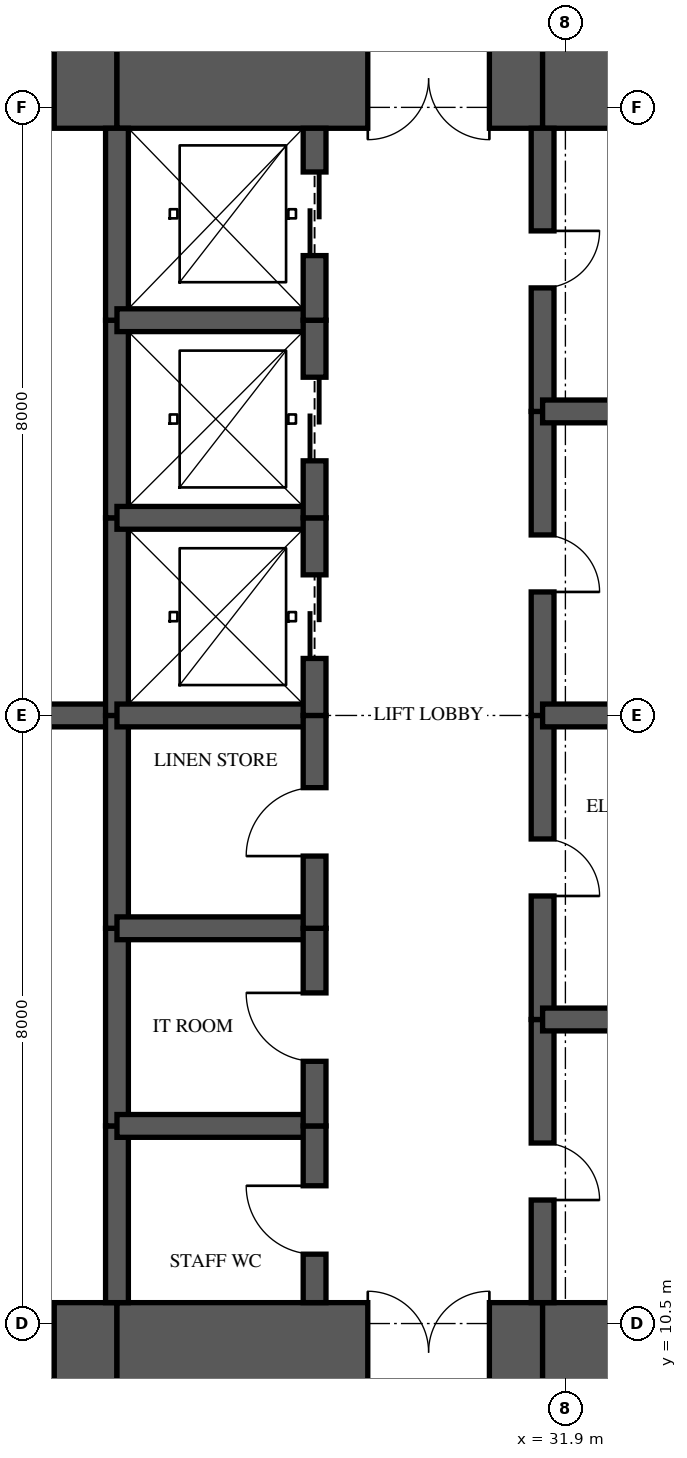
"""IFC4 building model, lengths in metres.
Left out: names, types, materials, properties, quantities, classifications, styles, units other than length and angle.
Written with IfcOpenShell. Run it as: python <this file> out.ifc"""

import sys

from ifc_helpers import new_model, si_unit, direction, frame, frame_2d, origin, place, context, subcontext, project, spatial, rectangle, extrude, element, fill, save


model = new_model("IFC4")
c1 = context("Model", 3, precision=1e-05, world=origin(), true_north=direction((0.0, 1.0)))
c2 = subcontext(c1, "Body", "Model", "MODEL_VIEW")
j1 = project(units=[si_unit("LENGTHUNIT", "METRE"), si_unit("PLANEANGLEUNIT", "RADIAN")], contexts=[c1])
p1 = place(None, origin())
s1 = spatial("IfcSite", under=j1, at=p1, CompositionType="ELEMENT")
p2 = place(p1, origin())
s2 = spatial("IfcBuilding", under=s1, at=p2, CompositionType="ELEMENT")
p3 = place(p2, frame((0.0, 0.0, 174.45)))
s3 = spatial("IfcBuildingStorey", under=s2, at=p3, CompositionType="ELEMENT", Elevation=174.45)
p4 = place(p3, frame((19.65, 10.125, 0.0), z_axis=(0.0, 0.0, 1.0), x_axis=(1.0, 0.0, 0.0)))
e1 = element("IfcWall", 1, at=p4, inside=s3, PredefinedType="SHEAR", context=c2, shape_type="SweptSolid", body=[
    extrude(rectangle(XDim=6.35, YDim=1.3, at=frame_2d((3.175, 0.0))), origin(), (0.0, 0.0, 1.0), 3.35),
])
p5 = place(p4, frame((4.775, 0.0, 0.0)))
e2 = element("IfcOpeningElement", 2, at=p5, cuts=e1, PredefinedType="OPENING", context=c2, shape_type="SweptSolid", body=[
    extrude(rectangle(XDim=0.75, YDim=2.1, at=frame_2d((0.375, 1.05))), frame((0.0, 0.66, 0.0), z_axis=(0.0, -1.0, 0.0), x_axis=(1.0, 0.0, 0.0)), (0.0, 0.0, 1.0), 1.32),
])
p6 = place(p3, frame((26.0, 10.125, 0.0), z_axis=(0.0, 0.0, 1.0), x_axis=(1.0, 0.0, 0.0)))
e3 = element("IfcWall", 3, at=p6, inside=s3, PredefinedType="SHEAR", context=c2, shape_type="SweptSolid", body=[
    extrude(rectangle(XDim=5.6, YDim=1.3, at=frame_2d((2.8, 0.0))), origin(), (0.0, 0.0, 1.0), 3.35),
])
p7 = place(p6, frame((3.3, 0.0, 0.0)))
e4 = element("IfcOpeningElement", 4, at=p7, cuts=e3, PredefinedType="OPENING", context=c2, shape_type="SweptSolid", body=[
    extrude(rectangle(XDim=1.6, YDim=2.1, at=frame_2d((0.8, 1.05))), frame((0.0, 0.66, 0.0), z_axis=(0.0, -1.0, 0.0), x_axis=(1.0, 0.0, 0.0)), (0.0, 0.0, 1.0), 1.32),
])
for number, where, z_axis, x_axis in (
    (5, (31.6, 10.125, 0.0), (0.0, 0.0, 1.0), (1.0, 0.0, 0.0)),
    (6, (35.9, 26.875, 0.0), (0.0, 0.0, 1.0), (-1.0, 0.0, 0.0)),
):
    element("IfcWall", number, at=place(p3, frame(where, z_axis=z_axis, x_axis=x_axis)), inside=s3, PredefinedType="SHEAR", context=c2, shape_type="SweptSolid", body=[
        extrude(rectangle(XDim=4.3, YDim=1.3, at=frame_2d((2.15, 0.0))), origin(), (0.0, 0.0, 1.0), 3.35),
    ])
p8 = place(p3, frame((31.6, 26.875, 0.0), z_axis=(0.0, 0.0, 1.0), x_axis=(-1.0, 0.0, 0.0)))
e7 = element("IfcWall", 7, at=p8, inside=s3, PredefinedType="SHEAR", context=c2, shape_type="SweptSolid", body=[
    extrude(rectangle(XDim=5.6, YDim=1.3, at=frame_2d((2.8, 0.0))), origin(), (0.0, 0.0, 1.0), 3.35),
])
p9 = place(p8, frame((0.7, 0.0, 0.0)))
e8 = element("IfcOpeningElement", 8, at=p9, cuts=e7, PredefinedType="OPENING", context=c2, shape_type="SweptSolid", body=[
    extrude(rectangle(XDim=1.6, YDim=2.1, at=frame_2d((0.8, 1.05))), frame((0.0, 0.66, 0.0), z_axis=(0.0, -1.0, 0.0), x_axis=(1.0, 0.0, 0.0)), (0.0, 0.0, 1.0), 1.32),
])
p10 = place(p3, frame((26.0, 26.875, 0.0), z_axis=(0.0, 0.0, 1.0), x_axis=(-1.0, 0.0, 0.0)))
e9 = element("IfcWall", 9, at=p10, inside=s3, PredefinedType="SHEAR", context=c2, shape_type="SweptSolid", body=[
    extrude(rectangle(XDim=6.35, YDim=1.3, at=frame_2d((3.175, 0.0))), origin(), (0.0, 0.0, 1.0), 3.35),
])
p11 = place(p10, frame((0.825, 0.0, 0.0)))
e10 = element("IfcOpeningElement", 10, at=p11, cuts=e9, PredefinedType="OPENING", context=c2, shape_type="SweptSolid", body=[
    extrude(rectangle(XDim=0.75, YDim=2.1, at=frame_2d((0.375, 1.05))), frame((0.0, 0.66, 0.0), z_axis=(0.0, -1.0, 0.0), x_axis=(1.0, 0.0, 0.0)), (0.0, 0.0, 1.0), 1.32),
])
p12 = place(p3, frame((26.0, 10.775, 0.0), z_axis=(0.0, 0.0, 1.0), x_axis=(0.0, 1.0, 0.0)))
e11 = element("IfcWall", 11, at=p12, inside=s3, PredefinedType="SHEAR", context=c2, shape_type="SweptSolid", body=[
    extrude(rectangle(XDim=2.325, YDim=0.3, at=frame_2d((1.163, 0.0))), origin(), (0.0, 0.0, 1.0), 3.35),
])
p13 = place(p3, frame((26.0, 13.1, 0.0), z_axis=(0.0, 0.0, 1.0), x_axis=(0.0, 1.0, 0.0)))
e12 = element("IfcWall", 12, at=p13, inside=s3, PredefinedType="SHEAR", context=c2, shape_type="SweptSolid", body=[
    extrude(rectangle(XDim=2.6, YDim=0.3, at=frame_2d((1.3, 0.0))), origin(), (0.0, 0.0, 1.0), 3.35),
])
p14 = place(p3, frame((26.0, 15.7, 0.0), z_axis=(0.0, 0.0, 1.0), x_axis=(0.0, 1.0, 0.0)))
e13 = element("IfcWall", 13, at=p14, inside=s3, PredefinedType="SHEAR", context=c2, shape_type="SweptSolid", body=[
    extrude(rectangle(XDim=2.8, YDim=0.3, at=frame_2d((1.4, 0.0))), origin(), (0.0, 0.0, 1.0), 3.35),
])
p15 = place(p3, frame((26.0, 18.5, 0.0), z_axis=(0.0, 0.0, 1.0), x_axis=(0.0, 1.0, 0.0)))
e14 = element("IfcWall", 14, at=p15, inside=s3, PredefinedType="SHEAR", context=c2, shape_type="SweptSolid", body=[
    extrude(rectangle(XDim=2.6, YDim=0.3, at=frame_2d((1.3, 0.0))), origin(), (0.0, 0.0, 1.0), 3.35),
])
p16 = place(p3, frame((26.0, 21.1, 0.0), z_axis=(0.0, 0.0, 1.0), x_axis=(0.0, 1.0, 0.0)))
e15 = element("IfcWall", 15, at=p16, inside=s3, PredefinedType="SHEAR", context=c2, shape_type="SweptSolid", body=[
    extrude(rectangle(XDim=2.6, YDim=0.3, at=frame_2d((1.3, 0.0))), origin(), (0.0, 0.0, 1.0), 3.35),
])
p17 = place(p3, frame((26.0, 23.7, 0.0), z_axis=(0.0, 0.0, 1.0), x_axis=(0.0, 1.0, 0.0)))
e16 = element("IfcWall", 16, at=p17, inside=s3, PredefinedType="SHEAR", context=c2, shape_type="SweptSolid", body=[
    extrude(rectangle(XDim=2.525, YDim=0.3, at=frame_2d((1.263, 0.0))), origin(), (0.0, 0.0, 1.0), 3.35),
])
p18 = place(p3, frame((28.6, 10.775, 0.0), z_axis=(0.0, 0.0, 1.0), x_axis=(0.0, 1.0, 0.0)))
e17 = element("IfcWall", 17, at=p18, inside=s3, PredefinedType="SHEAR", context=c2, shape_type="SweptSolid", body=[
    extrude(rectangle(XDim=2.325, YDim=0.3, at=frame_2d((1.163, 0.0))), origin(), (0.0, 0.0, 1.0), 3.35),
])
p19 = place(p18, frame((0.637, 0.0, 0.0)))
e18 = element("IfcOpeningElement", 18, at=p19, cuts=e17, PredefinedType="OPENING", context=c2, shape_type="SweptSolid", body=[
    extrude(rectangle(XDim=0.9, YDim=2.1, at=frame_2d((0.45, 1.05))), frame((0.0, 0.16, 0.0), z_axis=(0.0, -1.0, 0.0), x_axis=(1.0, 0.0, 0.0)), (0.0, 0.0, 1.0), 0.32),
])
p20 = place(p3, frame((28.6, 13.1, 0.0), z_axis=(0.0, 0.0, 1.0), x_axis=(0.0, 1.0, 0.0)))
e19 = element("IfcWall", 19, at=p20, inside=s3, PredefinedType="SHEAR", context=c2, shape_type="SweptSolid", body=[
    extrude(rectangle(XDim=2.6, YDim=0.3, at=frame_2d((1.3, 0.0))), origin(), (0.0, 0.0, 1.0), 3.35),
])
p21 = place(p20, frame((0.85, 0.0, 0.0)))
e20 = element("IfcOpeningElement", 20, at=p21, cuts=e19, PredefinedType="OPENING", context=c2, shape_type="SweptSolid", body=[
    extrude(rectangle(XDim=0.9, YDim=2.1, at=frame_2d((0.45, 1.05))), frame((0.0, 0.16, 0.0), z_axis=(0.0, -1.0, 0.0), x_axis=(1.0, 0.0, 0.0)), (0.0, 0.0, 1.0), 0.32),
])
p22 = place(p3, frame((28.6, 15.7, 0.0), z_axis=(0.0, 0.0, 1.0), x_axis=(0.0, 1.0, 0.0)))
e21 = element("IfcWall", 21, at=p22, inside=s3, PredefinedType="SHEAR", context=c2, shape_type="SweptSolid", body=[
    extrude(rectangle(XDim=2.8, YDim=0.3, at=frame_2d((1.4, 0.0))), origin(), (0.0, 0.0, 1.0), 3.35),
])
p23 = place(p22, frame((0.95, 0.0, 0.0)))
e22 = element("IfcOpeningElement", 22, at=p23, cuts=e21, PredefinedType="OPENING", context=c2, shape_type="SweptSolid", body=[
    extrude(rectangle(XDim=0.9, YDim=2.1, at=frame_2d((0.45, 1.05))), frame((0.0, 0.16, 0.0), z_axis=(0.0, -1.0, 0.0), x_axis=(1.0, 0.0, 0.0)), (0.0, 0.0, 1.0), 0.32),
])
p24 = place(p3, frame((28.6, 18.5, 0.0), z_axis=(0.0, 0.0, 1.0), x_axis=(0.0, 1.0, 0.0)))
e23 = element("IfcWall", 23, at=p24, inside=s3, PredefinedType="SHEAR", context=c2, shape_type="SweptSolid", body=[
    extrude(rectangle(XDim=2.6, YDim=0.3, at=frame_2d((1.3, 0.0))), origin(), (0.0, 0.0, 1.0), 3.35),
])
p25 = place(p24, frame((0.75, 0.0, 0.0)))
e24 = element("IfcOpeningElement", 24, at=p25, cuts=e23, PredefinedType="OPENING", context=c2, shape_type="SweptSolid", body=[
    extrude(rectangle(XDim=1.1, YDim=2.1, at=frame_2d((0.55, 1.05))), frame((0.0, 0.16, 0.0), z_axis=(0.0, -1.0, 0.0), x_axis=(1.0, 0.0, 0.0)), (0.0, 0.0, 1.0), 0.32),
])
p26 = place(p3, frame((28.6, 21.1, 0.0), z_axis=(0.0, 0.0, 1.0), x_axis=(0.0, 1.0, 0.0)))
e25 = element("IfcWall", 25, at=p26, inside=s3, PredefinedType="SHEAR", context=c2, shape_type="SweptSolid", body=[
    extrude(rectangle(XDim=2.6, YDim=0.3, at=frame_2d((1.3, 0.0))), origin(), (0.0, 0.0, 1.0), 3.35),
])
p27 = place(p26, frame((0.75, 0.0, 0.0)))
e26 = element("IfcOpeningElement", 26, at=p27, cuts=e25, PredefinedType="OPENING", context=c2, shape_type="SweptSolid", body=[
    extrude(rectangle(XDim=1.1, YDim=2.1, at=frame_2d((0.55, 1.05))), frame((0.0, 0.16, 0.0), z_axis=(0.0, -1.0, 0.0), x_axis=(1.0, 0.0, 0.0)), (0.0, 0.0, 1.0), 0.32),
])
p28 = place(p3, frame((28.6, 23.7, 0.0), z_axis=(0.0, 0.0, 1.0), x_axis=(0.0, 1.0, 0.0)))
e27 = element("IfcWall", 27, at=p28, inside=s3, PredefinedType="SHEAR", context=c2, shape_type="SweptSolid", body=[
    extrude(rectangle(XDim=2.525, YDim=0.3, at=frame_2d((1.263, 0.0))), origin(), (0.0, 0.0, 1.0), 3.35),
])
p29 = place(p28, frame((0.85, 0.0, 0.0)))
e28 = element("IfcOpeningElement", 28, at=p29, cuts=e27, PredefinedType="OPENING", context=c2, shape_type="SweptSolid", body=[
    extrude(rectangle(XDim=1.1, YDim=2.1, at=frame_2d((0.55, 1.05))), frame((0.0, 0.16, 0.0), z_axis=(0.0, -1.0, 0.0), x_axis=(1.0, 0.0, 0.0)), (0.0, 0.0, 1.0), 0.32),
])
p30 = place(p3, frame((31.6, 10.775, 0.0), z_axis=(0.0, 0.0, 1.0), x_axis=(0.0, 1.0, 0.0)))
e29 = element("IfcWall", 29, at=p30, inside=s3, PredefinedType="SHEAR", context=c2, shape_type="SweptSolid", body=[
    extrude(rectangle(XDim=3.725, YDim=0.3, at=frame_2d((1.863, 0.0))), origin(), (0.0, 0.0, 1.0), 3.35),
])
p31 = place(p30, frame((1.35, 0.0, 0.0)))
e30 = element("IfcOpeningElement", 30, at=p31, cuts=e29, PredefinedType="OPENING", context=c2, shape_type="SweptSolid", body=[
    extrude(rectangle(XDim=0.75, YDim=2.1, at=frame_2d((0.375, 1.05))), frame((0.0, 0.16, 0.0), z_axis=(0.0, -1.0, 0.0), x_axis=(1.0, 0.0, 0.0)), (0.0, 0.0, 1.0), 0.32),
])
p32 = place(p3, frame((31.6, 14.5, 0.0), z_axis=(0.0, 0.0, 1.0), x_axis=(0.0, 1.0, 0.0)))
e31 = element("IfcWall", 31, at=p32, inside=s3, PredefinedType="SHEAR", context=c2, shape_type="SweptSolid", body=[
    extrude(rectangle(XDim=4.0, YDim=0.3, at=frame_2d((2.0, 0.0))), origin(), (0.0, 0.0, 1.0), 3.35),
])
p33 = place(p32, frame((1.625, 0.0, 0.0)))
e32 = element("IfcOpeningElement", 32, at=p33, cuts=e31, PredefinedType="OPENING", context=c2, shape_type="SweptSolid", body=[
    extrude(rectangle(XDim=0.75, YDim=2.1, at=frame_2d((0.375, 1.05))), frame((0.0, 0.16, 0.0), z_axis=(0.0, -1.0, 0.0), x_axis=(1.0, 0.0, 0.0)), (0.0, 0.0, 1.0), 0.32),
])
p34 = place(p3, frame((31.6, 18.5, 0.0), z_axis=(0.0, 0.0, 1.0), x_axis=(0.0, 1.0, 0.0)))
e33 = element("IfcWall", 33, at=p34, inside=s3, PredefinedType="SHEAR", context=c2, shape_type="SweptSolid", body=[
    extrude(rectangle(XDim=4.0, YDim=0.3, at=frame_2d((2.0, 0.0))), origin(), (0.0, 0.0, 1.0), 3.35),
])
p35 = place(p34, frame((1.625, 0.0, 0.0)))
e34 = element("IfcOpeningElement", 34, at=p35, cuts=e33, PredefinedType="OPENING", context=c2, shape_type="SweptSolid", body=[
    extrude(rectangle(XDim=0.75, YDim=2.1, at=frame_2d((0.375, 1.05))), frame((0.0, 0.16, 0.0), z_axis=(0.0, -1.0, 0.0), x_axis=(1.0, 0.0, 0.0)), (0.0, 0.0, 1.0), 0.32),
])
p36 = place(p3, frame((31.6, 22.5, 0.0), z_axis=(0.0, 0.0, 1.0), x_axis=(0.0, 1.0, 0.0)))
e35 = element("IfcWall", 35, at=p36, inside=s3, PredefinedType="SHEAR", context=c2, shape_type="SweptSolid", body=[
    extrude(rectangle(XDim=3.725, YDim=0.3, at=frame_2d((1.863, 0.0))), origin(), (0.0, 0.0, 1.0), 3.35),
])
p37 = place(p36, frame((1.625, 0.0, 0.0)))
e36 = element("IfcOpeningElement", 36, at=p37, cuts=e35, PredefinedType="OPENING", context=c2, shape_type="SweptSolid", body=[
    extrude(rectangle(XDim=0.75, YDim=2.1, at=frame_2d((0.375, 1.05))), frame((0.0, 0.16, 0.0), z_axis=(0.0, -1.0, 0.0), x_axis=(1.0, 0.0, 0.0)), (0.0, 0.0, 1.0), 0.32),
])
p38 = place(p3, frame((23.6, 18.5, 0.0), z_axis=(0.0, 0.0, 1.0), x_axis=(1.0, 0.0, 0.0)))
e37 = element("IfcWall", 37, at=p38, inside=s3, PredefinedType="SHEAR", context=c2, shape_type="SweptSolid", body=[
    extrude(rectangle(XDim=2.4, YDim=0.3, at=frame_2d((1.2, 0.0))), origin(), (0.0, 0.0, 1.0), 3.35),
])
for number, where, z_axis, x_axis in (
    (38, (26.0, 13.1, 0.0), (0.0, 0.0, 1.0), (1.0, 0.0, 0.0)),
    (39, (26.0, 15.7, 0.0), (0.0, 0.0, 1.0), (1.0, 0.0, 0.0)),
    (40, (26.0, 18.5, 0.0), (0.0, 0.0, 1.0), (1.0, 0.0, 0.0)),
    (41, (26.0, 21.1, 0.0), (0.0, 0.0, 1.0), (1.0, 0.0, 0.0)),
    (42, (26.0, 23.7, 0.0), (0.0, 0.0, 1.0), (1.0, 0.0, 0.0)),
):
    element("IfcWall", number, at=place(p3, frame(where, z_axis=z_axis, x_axis=x_axis)), inside=s3, PredefinedType="SHEAR", context=c2, shape_type="SweptSolid", body=[
        extrude(rectangle(XDim=2.6, YDim=0.3, at=frame_2d((1.3, 0.0))), origin(), (0.0, 0.0, 1.0), 3.35),
    ])
for number, where, z_axis, x_axis in (
    (43, (31.6, 14.5, 0.0), (0.0, 0.0, 1.0), (1.0, 0.0, 0.0)),
    (44, (31.6, 18.5, 0.0), (0.0, 0.0, 1.0), (1.0, 0.0, 0.0)),
    (45, (31.6, 22.5, 0.0), (0.0, 0.0, 1.0), (1.0, 0.0, 0.0)),
):
    element("IfcWall", number, at=place(p3, frame(where, z_axis=z_axis, x_axis=x_axis)), inside=s3, PredefinedType="SHEAR", context=c2, shape_type="SweptSolid", body=[
        extrude(rectangle(XDim=4.3, YDim=0.3, at=frame_2d((2.15, 0.0))), origin(), (0.0, 0.0, 1.0), 3.35),
    ])
p39 = place(p25, origin())
e46 = element("IfcDoor", 46, at=p39, inside=s3, OperationType="SLIDING_TO_LEFT", PredefinedType="DOOR", context=c2, shape_type="SweptSolid", body=[
    extrude(rectangle(XDim=1.1, YDim=2.1, at=frame_2d((0.55, 1.05))), frame((0.0, 0.025, 0.0), z_axis=(0.0, -1.0, 0.0), x_axis=(1.0, 0.0, 0.0)), (0.0, 0.0, 1.0), 0.05),
])
fill(e24, e46)
p40 = place(p27, origin())
e47 = element("IfcDoor", 47, at=p40, inside=s3, OperationType="SLIDING_TO_LEFT", PredefinedType="DOOR", context=c2, shape_type="SweptSolid", body=[
    extrude(rectangle(XDim=1.1, YDim=2.1, at=frame_2d((0.55, 1.05))), frame((0.0, 0.025, 0.0), z_axis=(0.0, -1.0, 0.0), x_axis=(1.0, 0.0, 0.0)), (0.0, 0.0, 1.0), 0.05),
])
fill(e26, e47)
p41 = place(p29, origin())
e48 = element("IfcDoor", 48, at=p41, inside=s3, OperationType="SLIDING_TO_LEFT", PredefinedType="DOOR", context=c2, shape_type="SweptSolid", body=[
    extrude(rectangle(XDim=1.1, YDim=2.1, at=frame_2d((0.55, 1.05))), frame((0.0, 0.025, 0.0), z_axis=(0.0, -1.0, 0.0), x_axis=(1.0, 0.0, 0.0)), (0.0, 0.0, 1.0), 0.05),
])
fill(e28, e48)
p42 = place(p19, origin())
e49 = element("IfcDoor", 49, at=p42, inside=s3, OperationType="SINGLE_SWING_RIGHT", PredefinedType="DOOR", context=c2, shape_type="SweptSolid", body=[
    extrude(rectangle(XDim=0.9, YDim=2.1, at=frame_2d((0.45, 1.05))), frame((0.0, 0.025, 0.0), z_axis=(0.0, -1.0, 0.0), x_axis=(1.0, 0.0, 0.0)), (0.0, 0.0, 1.0), 0.05),
])
fill(e18, e49)
p43 = place(p21, origin())
e50 = element("IfcDoor", 50, at=p43, inside=s3, OperationType="SINGLE_SWING_RIGHT", PredefinedType="DOOR", context=c2, shape_type="SweptSolid", body=[
    extrude(rectangle(XDim=0.9, YDim=2.1, at=frame_2d((0.45, 1.05))), frame((0.0, 0.025, 0.0), z_axis=(0.0, -1.0, 0.0), x_axis=(1.0, 0.0, 0.0)), (0.0, 0.0, 1.0), 0.05),
])
fill(e20, e50)
p44 = place(p23, origin())
e51 = element("IfcDoor", 51, at=p44, inside=s3, OperationType="SINGLE_SWING_LEFT", PredefinedType="DOOR", context=c2, shape_type="SweptSolid", body=[
    extrude(rectangle(XDim=0.9, YDim=2.1, at=frame_2d((0.45, 1.05))), frame((0.0, 0.025, 0.0), z_axis=(0.0, -1.0, 0.0), x_axis=(1.0, 0.0, 0.0)), (0.0, 0.0, 1.0), 0.05),
])
fill(e22, e51)
p45 = place(p7, origin())
e52 = element("IfcDoor", 52, at=p45, inside=s3, OperationType="DOUBLE_DOOR_SINGLE_SWING", PredefinedType="DOOR", context=c2, shape_type="SweptSolid", body=[
    extrude(rectangle(XDim=1.6, YDim=2.1, at=frame_2d((0.8, 1.05))), frame((0.0, 0.025, 0.0), z_axis=(0.0, -1.0, 0.0), x_axis=(1.0, 0.0, 0.0)), (0.0, 0.0, 1.0), 0.05),
])
fill(e4, e52)
p46 = place(p9, origin())
e53 = element("IfcDoor", 53, at=p46, inside=s3, OperationType="DOUBLE_DOOR_SINGLE_SWING", PredefinedType="DOOR", context=c2, shape_type="SweptSolid", body=[
    extrude(rectangle(XDim=1.6, YDim=2.1, at=frame_2d((0.8, 1.05))), frame((0.0, 0.025, 0.0), z_axis=(0.0, -1.0, 0.0), x_axis=(1.0, 0.0, 0.0)), (0.0, 0.0, 1.0), 0.05),
])
fill(e8, e53)
p47 = place(p31, frame((0.75, 0.0, 0.0), z_axis=(0.0, 0.0, 1.0), x_axis=(-1.0, 0.0, 0.0)))
e54 = element("IfcDoor", 54, at=p47, inside=s3, OperationType="SINGLE_SWING_RIGHT", PredefinedType="DOOR", context=c2, shape_type="SweptSolid", body=[
    extrude(rectangle(XDim=0.75, YDim=2.1, at=frame_2d((0.375, 1.05))), frame((0.0, 0.025, 0.0), z_axis=(0.0, -1.0, 0.0), x_axis=(1.0, 0.0, 0.0)), (0.0, 0.0, 1.0), 0.05),
])
fill(e30, e54)
p48 = place(p33, frame((0.75, 0.0, 0.0), z_axis=(0.0, 0.0, 1.0), x_axis=(-1.0, 0.0, 0.0)))
e55 = element("IfcDoor", 55, at=p48, inside=s3, OperationType="SINGLE_SWING_RIGHT", PredefinedType="DOOR", context=c2, shape_type="SweptSolid", body=[
    extrude(rectangle(XDim=0.75, YDim=2.1, at=frame_2d((0.375, 1.05))), frame((0.0, 0.025, 0.0), z_axis=(0.0, -1.0, 0.0), x_axis=(1.0, 0.0, 0.0)), (0.0, 0.0, 1.0), 0.05),
])
fill(e32, e55)
p49 = place(p35, frame((0.75, 0.0, 0.0), z_axis=(0.0, 0.0, 1.0), x_axis=(-1.0, 0.0, 0.0)))
e56 = element("IfcDoor", 56, at=p49, inside=s3, OperationType="SINGLE_SWING_RIGHT", PredefinedType="DOOR", context=c2, shape_type="SweptSolid", body=[
    extrude(rectangle(XDim=0.75, YDim=2.1, at=frame_2d((0.375, 1.05))), frame((0.0, 0.025, 0.0), z_axis=(0.0, -1.0, 0.0), x_axis=(1.0, 0.0, 0.0)), (0.0, 0.0, 1.0), 0.05),
])
fill(e34, e56)
p50 = place(p37, frame((0.75, 0.0, 0.0), z_axis=(0.0, 0.0, 1.0), x_axis=(-1.0, 0.0, 0.0)))
e57 = element("IfcDoor", 57, at=p50, inside=s3, OperationType="SINGLE_SWING_LEFT", PredefinedType="DOOR", context=c2, shape_type="SweptSolid", body=[
    extrude(rectangle(XDim=0.75, YDim=2.1, at=frame_2d((0.375, 1.05))), frame((0.0, 0.025, 0.0), z_axis=(0.0, -1.0, 0.0), x_axis=(1.0, 0.0, 0.0)), (0.0, 0.0, 1.0), 0.05),
])
fill(e36, e57)
p51 = place(p5, origin())
e58 = element("IfcDoor", 58, at=p51, inside=s3, OperationType="SINGLE_SWING_LEFT", PredefinedType="DOOR", context=c2, shape_type="SweptSolid", body=[
    extrude(rectangle(XDim=0.75, YDim=2.1, at=frame_2d((0.375, 1.05))), frame((0.0, 0.025, 0.0), z_axis=(0.0, -1.0, 0.0), x_axis=(1.0, 0.0, 0.0)), (0.0, 0.0, 1.0), 0.05),
])
fill(e2, e58)
p52 = place(p11, origin())
e59 = element("IfcDoor", 59, at=p52, inside=s3, OperationType="SINGLE_SWING_RIGHT", PredefinedType="DOOR", context=c2, shape_type="SweptSolid", body=[
    extrude(rectangle(XDim=0.75, YDim=2.1, at=frame_2d((0.375, 1.05))), frame((0.0, 0.025, 0.0), z_axis=(0.0, -1.0, 0.0), x_axis=(1.0, 0.0, 0.0)), (0.0, 0.0, 1.0), 0.05),
])
fill(e10, e59)
save(model, sys.argv[1])
